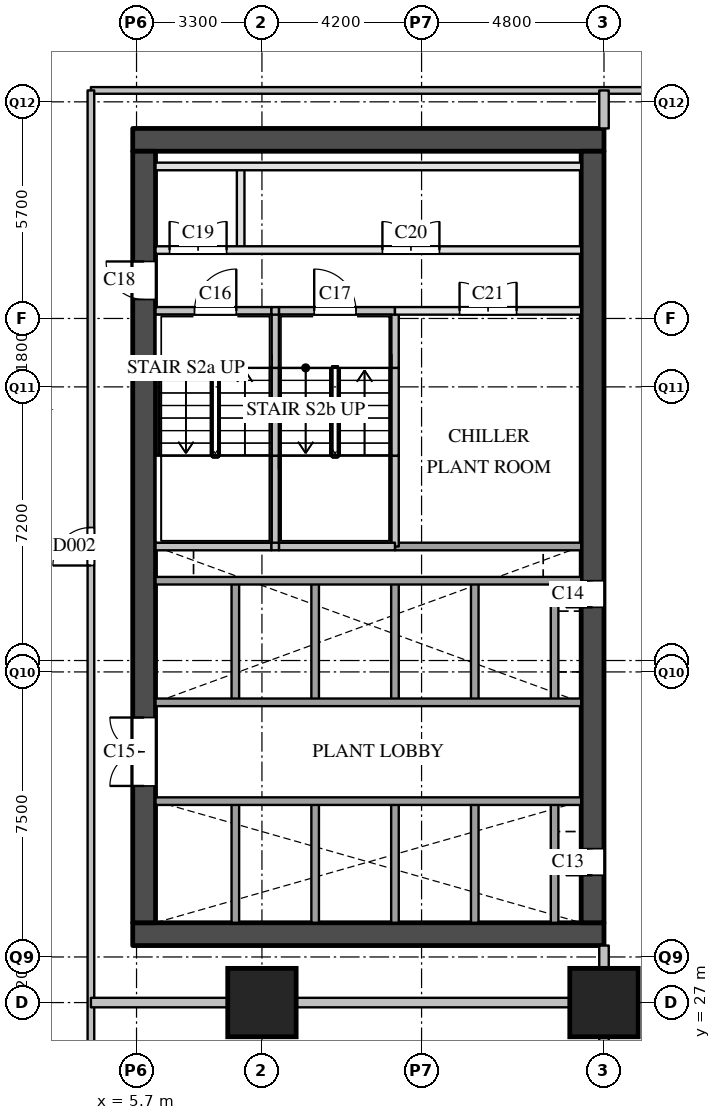
"""IFC4 building model, lengths in metres.
Left out: names, types, materials, properties, quantities, classifications, styles, units other than length and angle.
Written with IfcOpenShell. Run it as: python <this file> out.ifc"""

import sys

from ifc_helpers import new_model, si_unit, direction, frame, frame_2d, origin, origin_2d, place, context, subcontext, project, spatial, rectangle, extrude, element, fill, save


model = new_model("IFC4")
c1 = context("Model", 3, precision=1e-05, world=origin(), true_north=direction((0.0, 1.0)))
c2 = subcontext(c1, "Body", "Model", "MODEL_VIEW")
j1 = project(units=[si_unit("LENGTHUNIT", "METRE"), si_unit("PLANEANGLEUNIT", "RADIAN")], contexts=[c1])
p1 = place(None, origin())
s1 = spatial("IfcSite", under=j1, at=p1, CompositionType="ELEMENT")
p2 = place(p1, origin())
s2 = spatial("IfcBuilding", under=s1, at=p2, CompositionType="ELEMENT")
p3 = place(p2, frame((0.0, 0.0, 26.0)))
s3 = spatial("IfcBuildingStorey", under=s2, at=p3, CompositionType="ELEMENT", Elevation=26.0)
for number, where, z_axis, x_axis in (
    (1, (9.0, 27.0, 0.0), (0.0, 0.0, 1.0), (1.0, 0.0, 0.0)),
    (2, (18.0, 27.0, 0.0), (0.0, 0.0, 1.0), (1.0, 0.0, 0.0)),
):
    element("IfcColumn", number, at=place(p3, frame(where, z_axis=z_axis, x_axis=x_axis)), inside=s3, PredefinedType="COLUMN", context=c2, shape_type="SweptSolid", body=[
        extrude(rectangle(XDim=1.8, YDim=1.8, at=origin_2d()), origin(), (0.0, 0.0, 1.0), 5.0),
    ])
for number, where, z_axis, x_axis in (
    (3, (5.6, 28.8, 0.0), (0.0, 0.0, 1.0), (1.0, 0.0, 0.0)),
    (4, (5.6, 49.7, 0.0), (0.0, 0.0, 1.0), (1.0, 0.0, 0.0)),
):
    element("IfcWall", number, at=place(p3, frame(where, z_axis=z_axis, x_axis=x_axis)), inside=s3, PredefinedType="SHEAR", context=c2, shape_type="SweptSolid", body=[
        extrude(rectangle(XDim=12.4, YDim=0.6, at=frame_2d((6.2, 0.0))), origin(), (0.0, 0.0, 1.0), 4.7),
    ])
p4 = place(p3, frame((5.9, 29.1, 0.0), z_axis=(0.0, 0.0, 1.0), x_axis=(0.0, 1.0, 0.0)))
e5 = element("IfcWall", 5, at=p4, inside=s3, PredefinedType="SHEAR", context=c2, shape_type="SweptSolid", body=[
    extrude(rectangle(XDim=20.3, YDim=0.6, at=frame_2d((10.15, 0.0))), origin(), (0.0, 0.0, 1.0), 4.7),
])
p5 = place(p4, frame((3.6, 0.0, 0.0)))
e6 = element("IfcOpeningElement", 6, at=p5, cuts=e5, PredefinedType="OPENING", context=c2, shape_type="SweptSolid", body=[
    extrude(rectangle(XDim=1.8, YDim=2.1, at=frame_2d((0.9, 1.05))), frame((0.0, 0.31, 0.0), z_axis=(0.0, -1.0, 0.0), x_axis=(1.0, 0.0, 0.0)), (0.0, 0.0, 1.0), 0.62),
])
p6 = place(p4, frame((16.4, 0.0, 0.0)))
e7 = element("IfcOpeningElement", 7, at=p6, cuts=e5, PredefinedType="OPENING", context=c2, shape_type="SweptSolid", body=[
    extrude(rectangle(XDim=1.0, YDim=2.1, at=frame_2d((0.5, 1.05))), frame((0.0, 0.31, 0.0), z_axis=(0.0, -1.0, 0.0), x_axis=(1.0, 0.0, 0.0)), (0.0, 0.0, 1.0), 0.62),
])
p7 = place(p3, frame((17.7, 29.1, 0.0), z_axis=(0.0, 0.0, 1.0), x_axis=(0.0, 1.0, 0.0)))
e8 = element("IfcWall", 8, at=p7, inside=s3, PredefinedType="SHEAR", context=c2, shape_type="SweptSolid", body=[
    extrude(rectangle(XDim=20.3, YDim=0.6, at=frame_2d((10.15, 0.0))), origin(), (0.0, 0.0, 1.0), 4.7),
])
p8 = place(p7, frame((1.25, 0.0, 0.0)))
e9 = element("IfcOpeningElement", 9, at=p8, cuts=e8, PredefinedType="OPENING", context=c2, shape_type="SweptSolid", body=[
    extrude(rectangle(XDim=0.7, YDim=2.1, at=frame_2d((0.35, 1.05))), frame((0.0, 0.31, 0.0), z_axis=(0.0, -1.0, 0.0), x_axis=(1.0, 0.0, 0.0)), (0.0, 0.0, 1.0), 0.62),
])
p9 = place(p7, frame((8.3, 0.0, 0.0)))
e10 = element("IfcOpeningElement", 10, at=p9, cuts=e8, PredefinedType="OPENING", context=c2, shape_type="SweptSolid", body=[
    extrude(rectangle(XDim=0.7, YDim=2.1, at=frame_2d((0.35, 1.05))), frame((0.0, 0.31, 0.0), z_axis=(0.0, -1.0, 0.0), x_axis=(1.0, 0.0, 0.0)), (0.0, 0.0, 1.0), 0.62),
])
p10 = place(p3, frame((8.3, 29.1, 0.0), z_axis=(0.0, 0.0, 1.0), x_axis=(0.0, 1.0, 0.0)))
e11 = element("IfcWall", 11, at=p10, inside=s3, PredefinedType="SOLIDWALL", context=c2, shape_type="SweptSolid", body=[
    extrude(rectangle(XDim=3.2, YDim=0.2, at=frame_2d((1.6, 0.0))), origin(), (0.0, 0.0, 1.0), 4.7),
])
p11 = place(p3, frame((8.3, 34.9, 0.0), z_axis=(0.0, 0.0, 1.0), x_axis=(0.0, 1.0, 0.0)))
e12 = element("IfcWall", 12, at=p11, inside=s3, PredefinedType="SOLIDWALL", context=c2, shape_type="SweptSolid", body=[
    extrude(rectangle(XDim=3.2, YDim=0.2, at=frame_2d((1.6, 0.0))), origin(), (0.0, 0.0, 1.0), 4.7),
])
p12 = place(p3, frame((8.44, 46.8, 0.0), z_axis=(0.0, 0.0, 1.0), x_axis=(0.0, 1.0, 0.0)))
e13 = element("IfcWall", 13, at=p12, inside=s3, PredefinedType="PARTITIONING", context=c2, shape_type="SweptSolid", body=[
    extrude(rectangle(XDim=2.2, YDim=0.2, at=frame_2d((1.1, 0.0))), origin(), (0.0, 0.0, 1.0), 4.7),
])
p13 = place(p3, frame((9.35, 39.0, 0.0), z_axis=(0.0, 0.0, 1.0), x_axis=(0.0, 1.0, 0.0)))
e14 = element("IfcWall", 14, at=p13, inside=s3, PredefinedType="SOLIDWALL", context=c2, shape_type="SweptSolid", body=[
    extrude(rectangle(XDim=2.39, YDim=0.2, at=frame_2d((1.195, 0.0))), origin(), (0.0, 0.0, 1.0), 4.7),
])
p14 = place(p3, frame((9.35, 41.39, 0.0), z_axis=(0.0, 0.0, 1.0), x_axis=(0.0, 1.0, 0.0)))
e15 = element("IfcWall", 15, at=p14, inside=s3, PredefinedType="SOLIDWALL", context=c2, shape_type="SweptSolid", body=[
    extrude(rectangle(XDim=2.31, YDim=0.2, at=frame_2d((1.155, 0.0))), origin(), (0.0, 0.0, 1.0), 4.7),
])
p15 = place(p3, frame((9.35, 43.7, 0.0), z_axis=(0.0, 0.0, 1.0), x_axis=(0.0, 1.0, 0.0)))
e16 = element("IfcWall", 16, at=p15, inside=s3, PredefinedType="SOLIDWALL", context=c2, shape_type="SweptSolid", body=[
    extrude(rectangle(XDim=1.5, YDim=0.2, at=frame_2d((0.75, 0.0))), origin(), (0.0, 0.0, 1.0), 4.7),
])
p16 = place(p3, frame((10.4, 29.1, 0.0), z_axis=(0.0, 0.0, 1.0), x_axis=(0.0, 1.0, 0.0)))
e17 = element("IfcWall", 17, at=p16, inside=s3, PredefinedType="SOLIDWALL", context=c2, shape_type="SweptSolid", body=[
    extrude(rectangle(XDim=3.2, YDim=0.2, at=frame_2d((1.6, 0.0))), origin(), (0.0, 0.0, 1.0), 4.7),
])
p17 = place(p3, frame((10.4, 34.9, 0.0), z_axis=(0.0, 0.0, 1.0), x_axis=(0.0, 1.0, 0.0)))
e18 = element("IfcWall", 18, at=p17, inside=s3, PredefinedType="SOLIDWALL", context=c2, shape_type="SweptSolid", body=[
    extrude(rectangle(XDim=3.2, YDim=0.2, at=frame_2d((1.6, 0.0))), origin(), (0.0, 0.0, 1.0), 4.7),
])
p18 = place(p3, frame((12.5, 29.1, 0.0), z_axis=(0.0, 0.0, 1.0), x_axis=(0.0, 1.0, 0.0)))
e19 = element("IfcWall", 19, at=p18, inside=s3, PredefinedType="SOLIDWALL", context=c2, shape_type="SweptSolid", body=[
    extrude(rectangle(XDim=3.2, YDim=0.2, at=frame_2d((1.6, 0.0))), origin(), (0.0, 0.0, 1.0), 4.7),
])
p19 = place(p3, frame((12.5, 34.9, 0.0), z_axis=(0.0, 0.0, 1.0), x_axis=(0.0, 1.0, 0.0)))
e20 = element("IfcWall", 20, at=p19, inside=s3, PredefinedType="SOLIDWALL", context=c2, shape_type="SweptSolid", body=[
    extrude(rectangle(XDim=3.2, YDim=0.2, at=frame_2d((1.6, 0.0))), origin(), (0.0, 0.0, 1.0), 4.7),
])
p20 = place(p3, frame((12.5, 39.0, 0.0), z_axis=(0.0, 0.0, 1.0), x_axis=(0.0, 1.0, 0.0)))
e21 = element("IfcWall", 21, at=p20, inside=s3, PredefinedType="SOLIDWALL", context=c2, shape_type="SweptSolid", body=[
    extrude(rectangle(XDim=2.39, YDim=0.2, at=frame_2d((1.195, 0.0))), origin(), (0.0, 0.0, 1.0), 4.7),
])
p21 = place(p3, frame((12.5, 41.39, 0.0), z_axis=(0.0, 0.0, 1.0), x_axis=(0.0, 1.0, 0.0)))
e22 = element("IfcWall", 22, at=p21, inside=s3, PredefinedType="SOLIDWALL", context=c2, shape_type="SweptSolid", body=[
    extrude(rectangle(XDim=2.31, YDim=0.2, at=frame_2d((1.155, 0.0))), origin(), (0.0, 0.0, 1.0), 4.7),
])
p22 = place(p3, frame((12.5, 43.7, 0.0), z_axis=(0.0, 0.0, 1.0), x_axis=(0.0, 1.0, 0.0)))
e23 = element("IfcWall", 23, at=p22, inside=s3, PredefinedType="SOLIDWALL", context=c2, shape_type="SweptSolid", body=[
    extrude(rectangle(XDim=1.5, YDim=0.2, at=frame_2d((0.75, 0.0))), origin(), (0.0, 0.0, 1.0), 4.7),
])
p23 = place(p3, frame((14.6, 29.1, 0.0), z_axis=(0.0, 0.0, 1.0), x_axis=(0.0, 1.0, 0.0)))
e24 = element("IfcWall", 24, at=p23, inside=s3, PredefinedType="SOLIDWALL", context=c2, shape_type="SweptSolid", body=[
    extrude(rectangle(XDim=3.2, YDim=0.2, at=frame_2d((1.6, 0.0))), origin(), (0.0, 0.0, 1.0), 4.7),
])
p24 = place(p3, frame((14.6, 34.9, 0.0), z_axis=(0.0, 0.0, 1.0), x_axis=(0.0, 1.0, 0.0)))
e25 = element("IfcWall", 25, at=p24, inside=s3, PredefinedType="SOLIDWALL", context=c2, shape_type="SweptSolid", body=[
    extrude(rectangle(XDim=3.2, YDim=0.2, at=frame_2d((1.6, 0.0))), origin(), (0.0, 0.0, 1.0), 4.7),
])
p25 = place(p3, frame((16.7, 29.1, 0.0), z_axis=(0.0, 0.0, 1.0), x_axis=(0.0, 1.0, 0.0)))
e26 = element("IfcWall", 26, at=p25, inside=s3, PredefinedType="SOLIDWALL", context=c2, shape_type="SweptSolid", body=[
    extrude(rectangle(XDim=3.2, YDim=0.2, at=frame_2d((1.6, 0.0))), origin(), (0.0, 0.0, 1.0), 4.7),
])
p26 = place(p3, frame((16.7, 34.9, 0.0), z_axis=(0.0, 0.0, 1.0), x_axis=(0.0, 1.0, 0.0)))
e27 = element("IfcWall", 27, at=p26, inside=s3, PredefinedType="SOLIDWALL", context=c2, shape_type="SweptSolid", body=[
    extrude(rectangle(XDim=3.2, YDim=0.2, at=frame_2d((1.6, 0.0))), origin(), (0.0, 0.0, 1.0), 4.7),
])
for number, where, z_axis, x_axis in (
    (28, (6.2, 32.3, 0.0), (0.0, 0.0, 1.0), (1.0, 0.0, 0.0)),
    (29, (6.2, 34.9, 0.0), (0.0, 0.0, 1.0), (1.0, 0.0, 0.0)),
    (30, (6.2, 38.1, 0.0), (0.0, 0.0, 1.0), (1.0, 0.0, 0.0)),
):
    element("IfcWall", number, at=place(p3, frame(where, z_axis=z_axis, x_axis=x_axis)), inside=s3, PredefinedType="SOLIDWALL", context=c2, shape_type="SweptSolid", body=[
        extrude(rectangle(XDim=11.2, YDim=0.2, at=frame_2d((5.6, 0.0))), origin(), (0.0, 0.0, 1.0), 4.7),
    ])
p27 = place(p3, frame((12.5, 39.0, 0.0), z_axis=(0.0, 0.0, 1.0), x_axis=(1.0, 0.0, 0.0)))
e31 = element("IfcWall", 31, at=p27, inside=s3, PredefinedType="SOLIDWALL", context=c2, shape_type="SweptSolid", body=[
    extrude(rectangle(XDim=4.9, YDim=0.2, at=frame_2d((2.45, 0.0))), origin(), (0.0, 0.0, 1.0), 4.7),
])
p28 = place(p3, frame((6.2, 39.0, 0.0), z_axis=(0.0, 0.0, 1.0), x_axis=(1.0, 0.0, 0.0)))
e32 = element("IfcWall", 32, at=p28, inside=s3, PredefinedType="SOLIDWALL", context=c2, shape_type="SweptSolid", body=[
    extrude(rectangle(XDim=3.05, YDim=0.2, at=frame_2d((1.525, 0.0))), origin(), (0.0, 0.0, 1.0), 4.7),
])
p29 = place(p3, frame((9.25, 39.0, 0.0), z_axis=(0.0, 0.0, 1.0), x_axis=(1.0, 0.0, 0.0)))
e33 = element("IfcWall", 33, at=p29, inside=s3, PredefinedType="SOLIDWALL", context=c2, shape_type="SweptSolid", body=[
    extrude(rectangle(XDim=0.2, YDim=0.2, at=frame_2d((0.1, 0.0))), origin(), (0.0, 0.0, 1.0), 4.7),
])
p30 = place(p3, frame((9.45, 39.0, 0.0), z_axis=(0.0, 0.0, 1.0), x_axis=(1.0, 0.0, 0.0)))
e34 = element("IfcWall", 34, at=p30, inside=s3, PredefinedType="SOLIDWALL", context=c2, shape_type="SweptSolid", body=[
    extrude(rectangle(XDim=3.05, YDim=0.2, at=frame_2d((1.525, 0.0))), origin(), (0.0, 0.0, 1.0), 4.7),
])
p31 = place(p3, frame((12.5, 45.2, 0.0), z_axis=(0.0, 0.0, 1.0), x_axis=(1.0, 0.0, 0.0)))
e35 = element("IfcWall", 35, at=p31, inside=s3, PredefinedType="PARTITIONING", context=c2, shape_type="SweptSolid", body=[
    extrude(rectangle(XDim=4.9, YDim=0.2, at=frame_2d((2.45, 0.0))), origin(), (0.0, 0.0, 1.0), 4.7),
])
p32 = place(p31, frame((1.7, 0.0, 0.0)))
e36 = element("IfcOpeningElement", 36, at=p32, cuts=e35, PredefinedType="OPENING", context=c2, shape_type="SweptSolid", body=[
    extrude(rectangle(XDim=1.5, YDim=2.1, at=frame_2d((0.75, 1.05))), frame((0.0, 0.11, 0.0), z_axis=(0.0, -1.0, 0.0), x_axis=(1.0, 0.0, 0.0)), (0.0, 0.0, 1.0), 0.22),
])
p33 = place(p3, frame((6.2, 45.2, 0.0), z_axis=(0.0, 0.0, 1.0), x_axis=(1.0, 0.0, 0.0)))
e37 = element("IfcWall", 37, at=p33, inside=s3, PredefinedType="SOLIDWALL", context=c2, shape_type="SweptSolid", body=[
    extrude(rectangle(XDim=3.05, YDim=0.2, at=frame_2d((1.525, 0.0))), origin(), (0.0, 0.0, 1.0), 4.7),
])
p34 = place(p33, frame((1.025, 0.0, 0.0)))
e38 = element("IfcOpeningElement", 38, at=p34, cuts=e37, PredefinedType="OPENING", context=c2, shape_type="SweptSolid", body=[
    extrude(rectangle(XDim=1.1, YDim=2.1, at=frame_2d((0.55, 1.05))), frame((0.0, 0.11, 0.0), z_axis=(0.0, -1.0, 0.0), x_axis=(1.0, 0.0, 0.0)), (0.0, 0.0, 1.0), 0.22),
])
p35 = place(p3, frame((9.25, 45.2, 0.0), z_axis=(0.0, 0.0, 1.0), x_axis=(1.0, 0.0, 0.0)))
e39 = element("IfcWall", 39, at=p35, inside=s3, PredefinedType="SOLIDWALL", context=c2, shape_type="SweptSolid", body=[
    extrude(rectangle(XDim=0.2, YDim=0.2, at=frame_2d((0.1, 0.0))), origin(), (0.0, 0.0, 1.0), 4.7),
])
p36 = place(p3, frame((9.45, 45.2, 0.0), z_axis=(0.0, 0.0, 1.0), x_axis=(1.0, 0.0, 0.0)))
e40 = element("IfcWall", 40, at=p36, inside=s3, PredefinedType="SOLIDWALL", context=c2, shape_type="SweptSolid", body=[
    extrude(rectangle(XDim=3.05, YDim=0.2, at=frame_2d((1.525, 0.0))), origin(), (0.0, 0.0, 1.0), 4.7),
])
p37 = place(p36, frame((0.925, 0.0, 0.0)))
e41 = element("IfcOpeningElement", 41, at=p37, cuts=e40, PredefinedType="OPENING", context=c2, shape_type="SweptSolid", body=[
    extrude(rectangle(XDim=1.1, YDim=2.1, at=frame_2d((0.55, 1.05))), frame((0.0, 0.11, 0.0), z_axis=(0.0, -1.0, 0.0), x_axis=(1.0, 0.0, 0.0)), (0.0, 0.0, 1.0), 0.22),
])
p38 = place(p3, frame((6.2, 46.8, 0.0), z_axis=(0.0, 0.0, 1.0), x_axis=(1.0, 0.0, 0.0)))
e42 = element("IfcWall", 42, at=p38, inside=s3, PredefinedType="PARTITIONING", context=c2, shape_type="SweptSolid", body=[
    extrude(rectangle(XDim=11.2, YDim=0.2, at=frame_2d((5.6, 0.0))), origin(), (0.0, 0.0, 1.0), 4.7),
])
p39 = place(p38, frame((0.37, 0.0, 0.0)))
e43 = element("IfcOpeningElement", 43, at=p39, cuts=e42, PredefinedType="OPENING", context=c2, shape_type="SweptSolid", body=[
    extrude(rectangle(XDim=1.5, YDim=2.1, at=frame_2d((0.75, 1.05))), frame((0.0, 0.11, 0.0), z_axis=(0.0, -1.0, 0.0), x_axis=(1.0, 0.0, 0.0)), (0.0, 0.0, 1.0), 0.22),
])
p40 = place(p38, frame((5.97, 0.0, 0.0)))
e44 = element("IfcOpeningElement", 44, at=p40, cuts=e42, PredefinedType="OPENING", context=c2, shape_type="SweptSolid", body=[
    extrude(rectangle(XDim=1.5, YDim=2.1, at=frame_2d((0.75, 1.05))), frame((0.0, 0.11, 0.0), z_axis=(0.0, -1.0, 0.0), x_axis=(1.0, 0.0, 0.0)), (0.0, 0.0, 1.0), 0.22),
])
p41 = place(p3, frame((6.2, 49.0, 0.0), z_axis=(0.0, 0.0, 1.0), x_axis=(1.0, 0.0, 0.0)))
e45 = element("IfcWall", 45, at=p41, inside=s3, PredefinedType="PARTITIONING", context=c2, shape_type="SweptSolid", body=[
    extrude(rectangle(XDim=11.2, YDim=0.2, at=frame_2d((5.6, 0.0))), origin(), (0.0, 0.0, 1.0), 4.7),
])
p42 = place(p3, frame((4.5, 51.0, 0.0), z_axis=(0.0, 0.0, 1.0), x_axis=(1.0, 0.0, 0.0)))
e46 = element("IfcWall", 46, at=p42, inside=s3, PredefinedType="PARTITIONING", context=c2, shape_type="SweptSolid", body=[
    extrude(rectangle(XDim=45.0, YDim=0.175, at=frame_2d((22.5, 0.0))), origin(), (0.0, 0.0, 1.0), 4.7),
])
p43 = place(p42, frame((22.0, 0.0, 0.0)))
e47 = element("IfcOpeningElement", 47, at=p43, cuts=e46, PredefinedType="OPENING", context=c2, shape_type="SweptSolid", body=[
    extrude(rectangle(XDim=1.0, YDim=2.1, at=frame_2d((0.5, 1.05))), frame((0.0, 0.097, 0.0), z_axis=(0.0, -1.0, 0.0), x_axis=(1.0, 0.0, 0.0)), (0.0, 0.0, 1.0), 0.195),
])
p44 = place(p3, frame((4.5, 0.0, 0.0), z_axis=(0.0, 0.0, 1.0), x_axis=(0.0, 1.0, 0.0)))
e48 = element("IfcWall", 48, at=p44, inside=s3, PredefinedType="PARTITIONING", context=c2, shape_type="SweptSolid", body=[
    extrude(rectangle(XDim=51.0, YDim=0.175, at=frame_2d((25.5, 0.0))), origin(), (0.0, 0.0, 1.0), 4.7),
])
p45 = place(p44, frame((13.0, 0.0, 0.0)))
e49 = element("IfcOpeningElement", 49, at=p45, cuts=e48, PredefinedType="OPENING", context=c2, shape_type="SweptSolid", body=[
    extrude(rectangle(XDim=1.0, YDim=2.1, at=frame_2d((0.5, 1.05))), frame((0.0, 0.097, 0.0), z_axis=(0.0, -1.0, 0.0), x_axis=(1.0, 0.0, 0.0)), (0.0, 0.0, 1.0), 0.195),
])
p46 = place(p44, frame((38.5, 0.0, 0.0)))
e50 = element("IfcOpeningElement", 50, at=p46, cuts=e48, PredefinedType="OPENING", context=c2, shape_type="SweptSolid", body=[
    extrude(rectangle(XDim=1.0, YDim=2.1, at=frame_2d((0.5, 1.05))), frame((0.0, 0.097, 0.0), z_axis=(0.0, -1.0, 0.0), x_axis=(1.0, 0.0, 0.0)), (0.0, 0.0, 1.0), 0.195),
])
p47 = place(p3, frame((4.5, 27.0, 0.0), z_axis=(0.0, 0.0, 1.0), x_axis=(1.0, 0.0, 0.0)))
e51 = element("IfcWall", 51, at=p47, inside=s3, PredefinedType="PARTITIONING", context=c2, shape_type="SweptSolid", body=[
    extrude(rectangle(XDim=13.5, YDim=0.25, at=frame_2d((6.75, 0.0))), origin(), (0.0, 0.0, 1.0), 4.7),
])
p48 = place(p3, frame((18.0, 22.5, 0.0), z_axis=(0.0, 0.0, 1.0), x_axis=(0.0, 1.0, 0.0)))
e52 = element("IfcWall", 52, at=p48, inside=s3, PredefinedType="PARTITIONING", context=c2, shape_type="SweptSolid", body=[
    extrude(rectangle(XDim=6.0, YDim=0.25, at=frame_2d((3.0, 0.0))), origin(), (0.0, 0.0, 1.0), 4.7),
])
p49 = place(p3, frame((18.0, 50.0, 0.0), z_axis=(0.0, 0.0, 1.0), x_axis=(0.0, 1.0, 0.0)))
e53 = element("IfcWall", 53, at=p49, inside=s3, PredefinedType="PARTITIONING", context=c2, shape_type="SweptSolid", body=[
    extrude(rectangle(XDim=1.0, YDim=0.25, at=frame_2d((0.5, 0.0))), origin(), (0.0, 0.0, 1.0), 4.7),
])
p50 = place(p8, origin())
e54 = element("IfcDoor", 54, at=p50, inside=s3, OperationType="SINGLE_SWING_LEFT", PredefinedType="DOOR", context=c2, shape_type="SweptSolid", body=[
    extrude(rectangle(XDim=0.7, YDim=2.1, at=frame_2d((0.35, 1.05))), frame((0.0, 0.025, 0.0), z_axis=(0.0, -1.0, 0.0), x_axis=(1.0, 0.0, 0.0)), (0.0, 0.0, 1.0), 0.05),
])
fill(e9, e54)
p51 = place(p9, origin())
e55 = element("IfcDoor", 55, at=p51, inside=s3, OperationType="SINGLE_SWING_LEFT", PredefinedType="DOOR", context=c2, shape_type="SweptSolid", body=[
    extrude(rectangle(XDim=0.7, YDim=2.1, at=frame_2d((0.35, 1.05))), frame((0.0, 0.025, 0.0), z_axis=(0.0, -1.0, 0.0), x_axis=(1.0, 0.0, 0.0)), (0.0, 0.0, 1.0), 0.05),
])
fill(e10, e55)
p52 = place(p5, origin())
e56 = element("IfcDoor", 56, at=p52, inside=s3, OperationType="DOUBLE_DOOR_SINGLE_SWING", PredefinedType="DOOR", context=c2, shape_type="SweptSolid", body=[
    extrude(rectangle(XDim=1.8, YDim=2.1, at=frame_2d((0.9, 1.05))), frame((0.0, 0.025, 0.0), z_axis=(0.0, -1.0, 0.0), x_axis=(1.0, 0.0, 0.0)), (0.0, 0.0, 1.0), 0.05),
])
fill(e6, e56)
p53 = place(p34, origin())
e57 = element("IfcDoor", 57, at=p53, inside=s3, OperationType="SINGLE_SWING_RIGHT", PredefinedType="DOOR", context=c2, shape_type="SweptSolid", body=[
    extrude(rectangle(XDim=1.1, YDim=2.1, at=frame_2d((0.55, 1.05))), frame((0.0, 0.025, 0.0), z_axis=(0.0, -1.0, 0.0), x_axis=(1.0, 0.0, 0.0)), (0.0, 0.0, 1.0), 0.05),
])
fill(e38, e57)
p54 = place(p37, origin())
e58 = element("IfcDoor", 58, at=p54, inside=s3, OperationType="SINGLE_SWING_LEFT", PredefinedType="DOOR", context=c2, shape_type="SweptSolid", body=[
    extrude(rectangle(XDim=1.1, YDim=2.1, at=frame_2d((0.55, 1.05))), frame((0.0, 0.025, 0.0), z_axis=(0.0, -1.0, 0.0), x_axis=(1.0, 0.0, 0.0)), (0.0, 0.0, 1.0), 0.05),
])
fill(e41, e58)
p55 = place(p6, origin())
e59 = element("IfcDoor", 59, at=p55, inside=s3, OperationType="SINGLE_SWING_RIGHT", PredefinedType="DOOR", context=c2, shape_type="SweptSolid", body=[
    extrude(rectangle(XDim=1.0, YDim=2.1, at=frame_2d((0.5, 1.05))), frame((0.0, 0.025, 0.0), z_axis=(0.0, -1.0, 0.0), x_axis=(1.0, 0.0, 0.0)), (0.0, 0.0, 1.0), 0.05),
])
fill(e7, e59)
p56 = place(p39, origin())
e60 = element("IfcDoor", 60, at=p56, inside=s3, OperationType="DOUBLE_DOOR_SINGLE_SWING", PredefinedType="DOOR", context=c2, shape_type="SweptSolid", body=[
    extrude(rectangle(XDim=1.5, YDim=2.1, at=frame_2d((0.75, 1.05))), frame((0.0, 0.025, 0.0), z_axis=(0.0, -1.0, 0.0), x_axis=(1.0, 0.0, 0.0)), (0.0, 0.0, 1.0), 0.05),
])
fill(e43, e60)
p57 = place(p40, origin())
e61 = element("IfcDoor", 61, at=p57, inside=s3, OperationType="DOUBLE_DOOR_SINGLE_SWING", PredefinedType="DOOR", context=c2, shape_type="SweptSolid", body=[
    extrude(rectangle(XDim=1.5, YDim=2.1, at=frame_2d((0.75, 1.05))), frame((0.0, 0.025, 0.0), z_axis=(0.0, -1.0, 0.0), x_axis=(1.0, 0.0, 0.0)), (0.0, 0.0, 1.0), 0.05),
])
fill(e44, e61)
p58 = place(p32, origin())
e62 = element("IfcDoor", 62, at=p58, inside=s3, OperationType="DOUBLE_DOOR_SINGLE_SWING", PredefinedType="DOOR", context=c2, shape_type="SweptSolid", body=[
    extrude(rectangle(XDim=1.5, YDim=2.1, at=frame_2d((0.75, 1.05))), frame((0.0, 0.025, 0.0), z_axis=(0.0, -1.0, 0.0), x_axis=(1.0, 0.0, 0.0)), (0.0, 0.0, 1.0), 0.05),
])
fill(e36, e62)
p59 = place(p46, origin())
e63 = element("IfcDoor", 63, at=p59, inside=s3, OperationType="SINGLE_SWING_LEFT", PredefinedType="DOOR", context=c2, shape_type="SweptSolid", body=[
    extrude(rectangle(XDim=1.0, YDim=2.1, at=frame_2d((0.5, 1.05))), frame((0.0, 0.025, 0.0), z_axis=(0.0, -1.0, 0.0), x_axis=(1.0, 0.0, 0.0)), (0.0, 0.0, 1.0), 0.05),
])
fill(e50, e63)
save(model, sys.argv[1])
